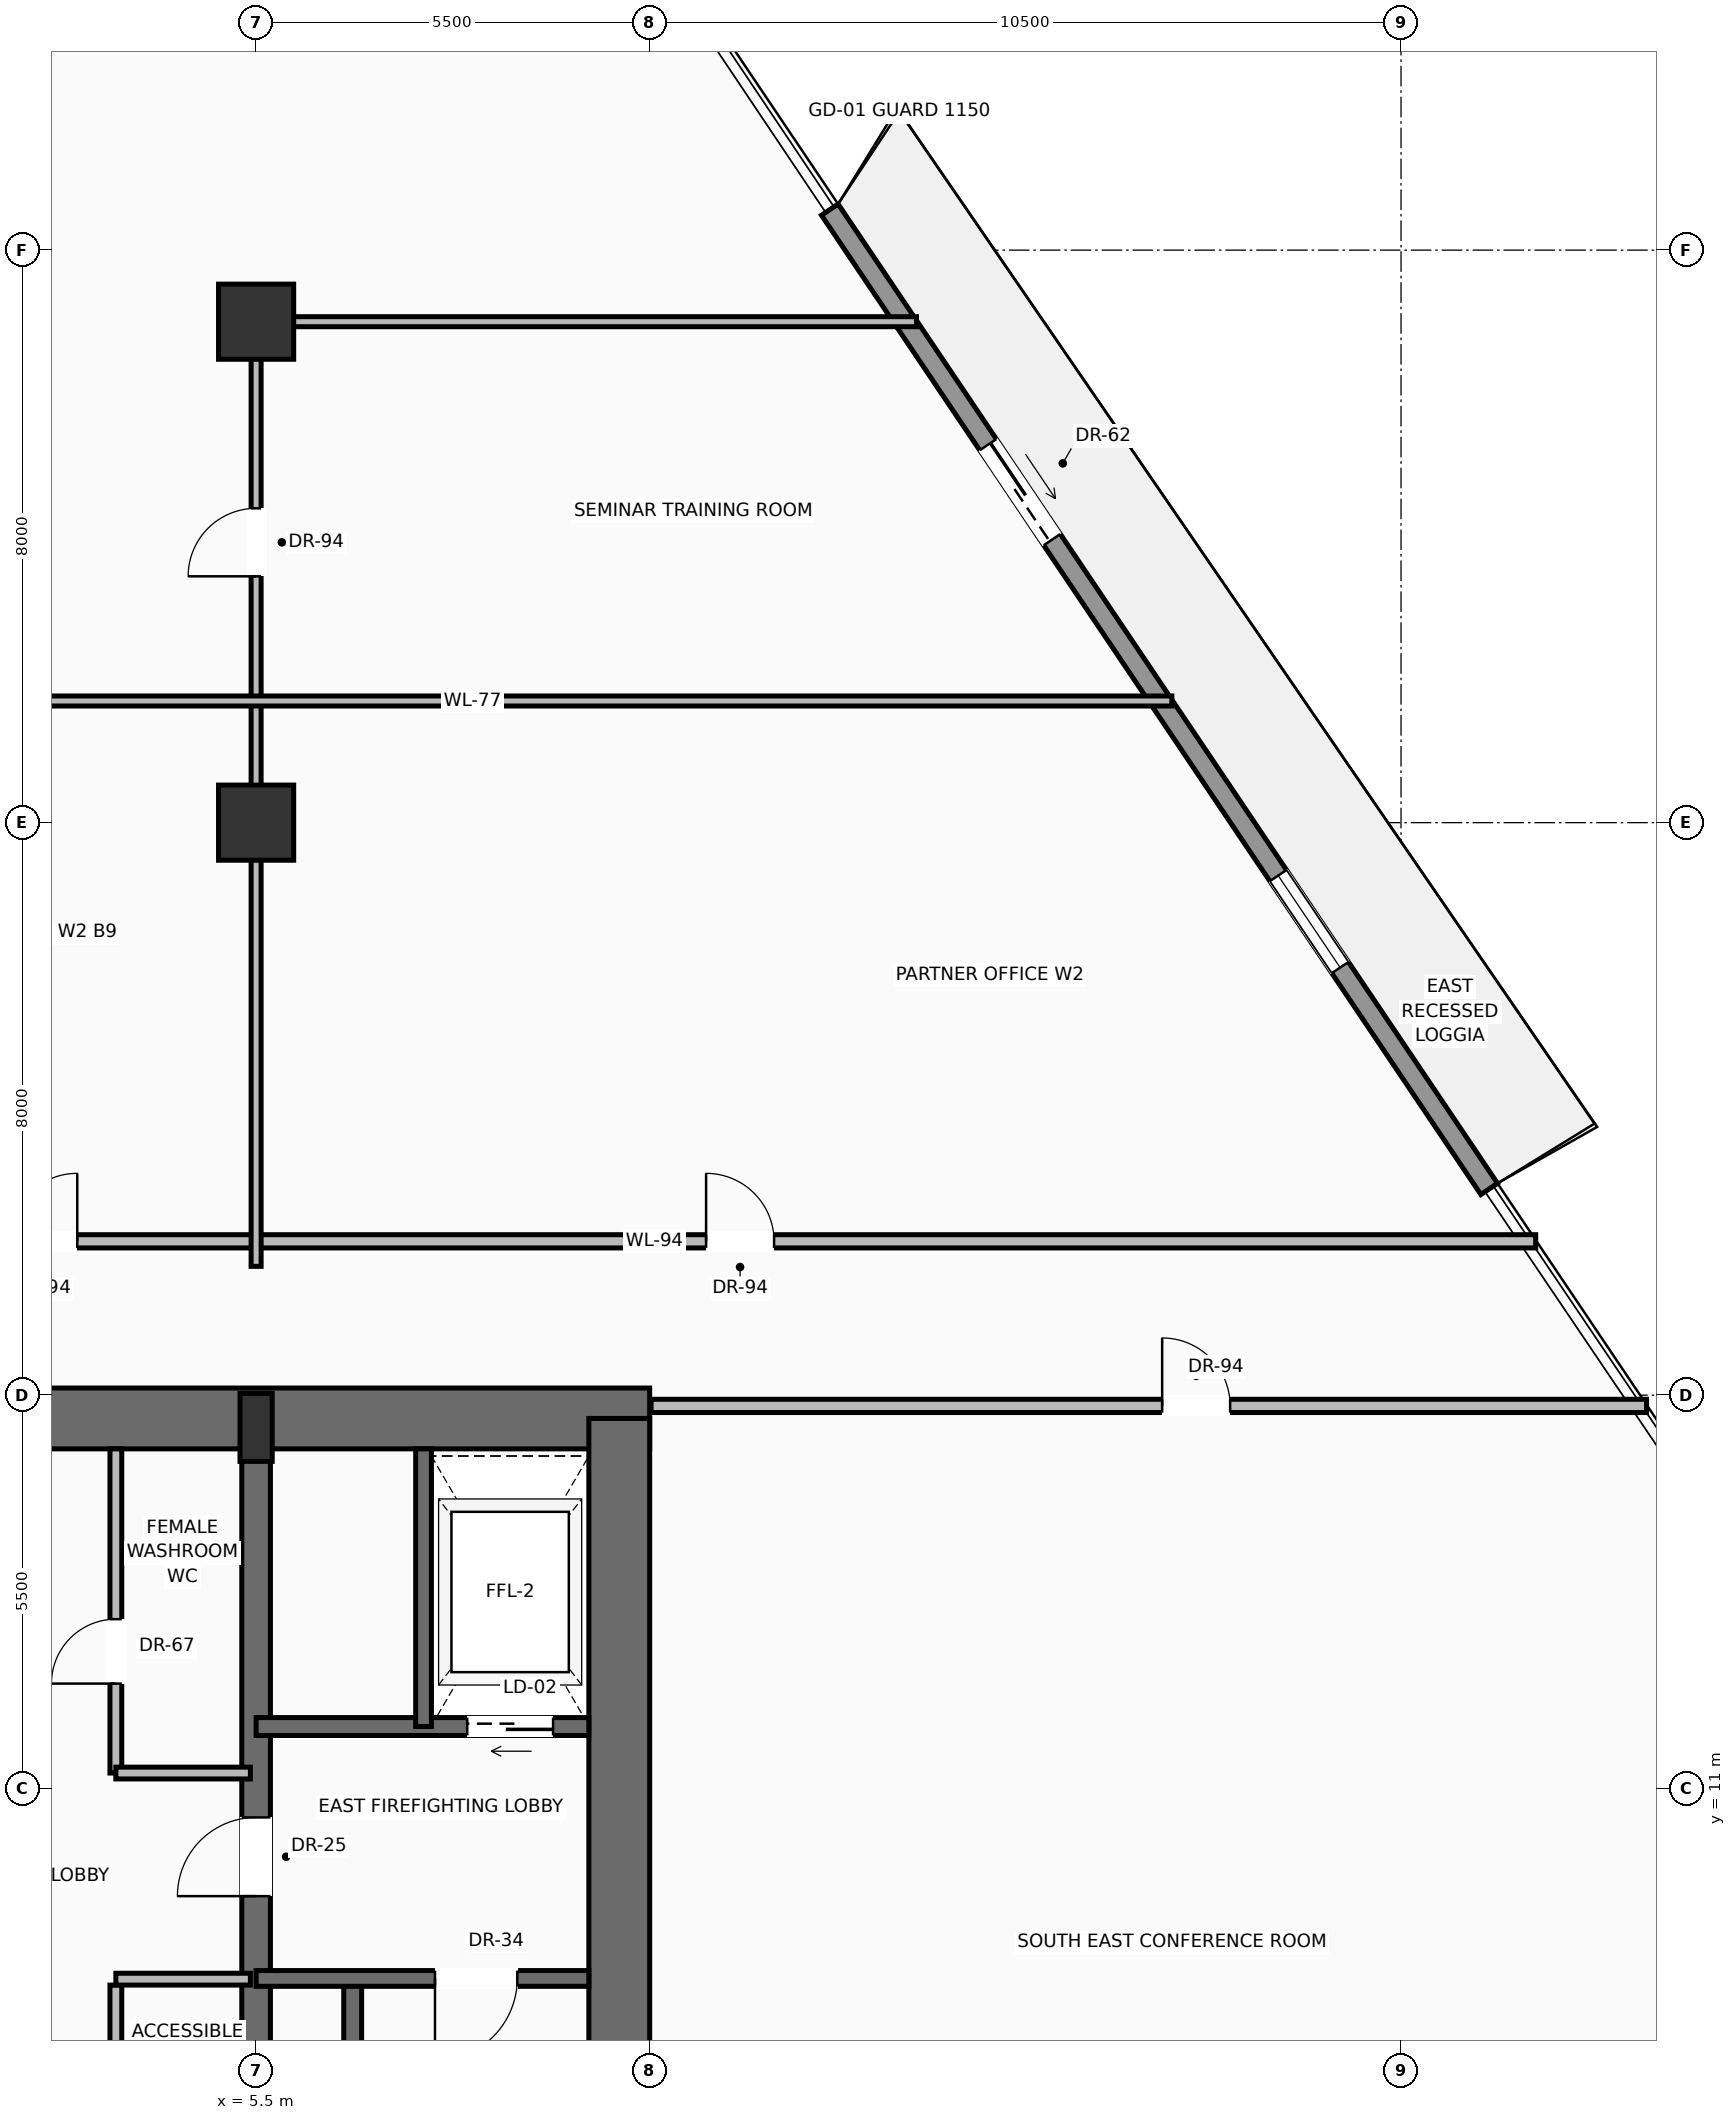
"""IFC4 building model, lengths in metres.
Left out: names, types, materials, properties, quantities, classifications, styles, units other than length and angle.
Written with IfcOpenShell. Run it as: python <this file> out.ifc"""

import sys

from ifc_helpers import new_model, si_unit, direction, frame, frame_2d, origin, origin_2d, place, context, subcontext, project, spatial, rectangle, extrude, source, transform, mapped, element, fill, save


model = new_model("IFC4")
c1 = context("Model", 3, precision=1e-05, world=origin(), true_north=direction((0.0, 1.0)))
c2 = subcontext(c1, "Body", "Model", "MODEL_VIEW")
j1 = project(units=[si_unit("LENGTHUNIT", "METRE"), si_unit("PLANEANGLEUNIT", "RADIAN")], contexts=[c1])
p1 = place(None, origin())
s1 = spatial("IfcSite", under=j1, at=p1, CompositionType="ELEMENT")
p2 = place(p1, origin())
s2 = spatial("IfcBuilding", under=s1, at=p2, CompositionType="ELEMENT")
p3 = place(p2, frame((0.0, 0.0, 42.3)))
s3 = spatial("IfcBuildingStorey", under=s2, at=p3, CompositionType="ELEMENT", Elevation=42.3)
p4 = place(p3, frame((-11.0, 16.175, 0.0), z_axis=(0.0, 0.0, 1.0), x_axis=(1.0, 0.0, 0.0)))
e1 = element("IfcWall", 1, at=p4, inside=s3, PredefinedType="SHEAR", context=c2, shape_type="SweptSolid", body=[
    extrude(rectangle(XDim=22.0, YDim=0.85, at=frame_2d((11.0, 0.0))), origin(), (0.0, 0.0, 1.0), 3.45),
])
p5 = place(p4, frame((3.57, 0.0, 0.0)))
e2 = element("IfcOpeningElement", 2, at=p5, cuts=e1, PredefinedType="OPENING", context=c2, shape_type="SweptSolid", body=[
    extrude(rectangle(XDim=1.3, YDim=2.3, at=frame_2d((0.65, 1.15))), frame((0.0, 0.435, 0.0), z_axis=(0.0, -1.0, 0.0), x_axis=(1.0, 0.0, 0.0)), (0.0, 0.0, 1.0), 0.87),
])
p6 = place(p4, frame((10.0, 0.0, 0.0)))
e3 = element("IfcOpeningElement", 3, at=p6, cuts=e1, PredefinedType="OPENING", context=c2, shape_type="SweptSolid", body=[
    extrude(rectangle(XDim=2.0, YDim=2.4, at=frame_2d((1.0, 1.2))), frame((0.0, 0.435, 0.0), z_axis=(0.0, -1.0, 0.0), x_axis=(1.0, 0.0, 0.0)), (0.0, 0.0, 1.0), 0.87),
])
p7 = place(p3, frame((10.575, 0.425, 0.0), z_axis=(0.0, 0.0, 1.0), x_axis=(0.0, 1.0, 0.0)))
e4 = element("IfcWall", 4, at=p7, inside=s3, PredefinedType="SHEAR", context=c2, shape_type="SweptSolid", body=[
    extrude(rectangle(XDim=15.75, YDim=0.85, at=frame_2d((7.875, 0.0))), origin(), (0.0, 0.0, 1.0), 3.45),
])
p8 = place(p3, frame((5.5, 0.425, 0.0), z_axis=(0.0, 0.0, 1.0), x_axis=(0.0, 1.0, 0.0)))
e5 = element("IfcWall", 5, at=p8, inside=s3, PredefinedType="SHEAR", context=c2, shape_type="SweptSolid", body=[
    extrude(rectangle(XDim=15.75, YDim=0.4, at=frame_2d((7.875, 0.0))), origin(), (0.0, 0.0, 1.0), 3.45),
])
p9 = place(p8, frame((9.075, 0.0, 0.0)))
e6 = element("IfcOpeningElement", 6, at=p9, cuts=e5, PredefinedType="OPENING", context=c2, shape_type="SweptSolid", body=[
    extrude(rectangle(XDim=1.1, YDim=2.2, at=frame_2d((0.55, 1.1))), frame((0.0, 0.21, 0.0), z_axis=(0.0, -1.0, 0.0), x_axis=(1.0, 0.0, 0.0)), (0.0, 0.0, 1.0), 0.42),
])
m1 = source(origin(), c2, "Body", "SweptSolid", [
    extrude(rectangle(XDim=0.45, YDim=0.95, at=origin_2d()), origin(), (0.0, 0.0, 1.0), 3.7),
])
p10 = place(p3, frame((5.5, 16.05, 0.0), z_axis=(0.0, 0.0, 1.0), x_axis=(1.0, 0.0, 0.0)))
e7 = element("IfcColumn", 7, at=p10, inside=s3, PredefinedType="PILASTER", context=c2, shape_type="MappedRepresentation", body=[
    mapped(m1, transform((0.0, 0.0, 0.0), scale=1.0)),
])
m2 = source(origin(), c2, "Body", "SweptSolid", [
    extrude(rectangle(XDim=1.05, YDim=1.05, at=origin_2d()), origin(), (0.0, 0.0, 1.0), 3.7),
])
for number, where, z_axis, x_axis in (
    (8, (5.5, 24.5, 0.0), (0.0, 0.0, 1.0), (1.0, 0.0, 0.0)),
    (9, (5.5, 31.5, 0.0), (0.0, 0.0, 1.0), (1.0, 0.0, 0.0)),
):
    element("IfcColumn", number, at=place(p3, frame(where, z_axis=z_axis, x_axis=x_axis)), inside=s3, PredefinedType="COLUMN", context=c2, shape_type="MappedRepresentation", body=[
        mapped(m2, transform((0.0, 0.0, 0.0), scale=1.0)),
    ])
p11 = place(p3, frame((13.517, 33.066, 0.0), z_axis=(0.0, 0.0, 1.0), x_axis=(0.558563601605, -0.829461694692, 0.0)))
e10 = element("IfcWall", 10, at=p11, inside=s3, PredefinedType="SOLIDWALL", context=c2, shape_type="SweptSolid", body=[
    extrude(rectangle(XDim=16.497, YDim=0.28, at=frame_2d((8.249, 0.0))), origin(), (0.0, 0.0, 1.0), 3.03),
])
p12 = place(p11, frame((3.959, 0.0, 0.0)))
e11 = element("IfcOpeningElement", 11, at=p12, cuts=e10, PredefinedType="OPENING", context=c2, shape_type="SweptSolid", body=[
    extrude(rectangle(XDim=1.6, YDim=2.35, at=frame_2d((0.8, 1.175))), frame((0.0, 0.15, 0.0), z_axis=(0.0, -1.0, 0.0), x_axis=(1.0, 0.0, 0.0)), (0.0, 0.0, 1.0), 0.3),
])
p13 = place(p11, frame((11.218, 0.0, 0.9)))
e12 = element("IfcOpeningElement", 12, at=p13, cuts=e10, PredefinedType="OPENING", context=c2, shape_type="SweptSolid", body=[
    extrude(rectangle(XDim=1.55, YDim=1.85, at=frame_2d((0.775, 0.925))), frame((0.0, 0.15, 0.0), z_axis=(0.0, -1.0, 0.0), x_axis=(1.0, 0.0, 0.0)), (0.0, 0.0, 1.0), 0.3),
])
p14 = place(p3, frame((6.85, 0.85, 0.0), z_axis=(0.0, 0.0, 1.0), x_axis=(0.0, 1.0, 0.0)))
e13 = element("IfcWall", 13, at=p14, inside=s3, PredefinedType="SOLIDWALL", context=c2, shape_type="SweptSolid", body=[
    extrude(rectangle(XDim=7.5, YDim=0.25, at=frame_2d((3.75, 0.0))), origin(), (0.0, 0.0, 1.0), 3.45),
])
p15 = place(p3, frame((10.15, 8.35, 0.0), z_axis=(0.0, 0.0, 1.0), x_axis=(-1.0, 0.0, 0.0)))
e14 = element("IfcWall", 14, at=p15, inside=s3, PredefinedType="SOLIDWALL", context=c2, shape_type="SweptSolid", body=[
    extrude(rectangle(XDim=4.65, YDim=0.22, at=frame_2d((2.325, 0.0))), origin(), (0.0, 0.0, 1.0), 3.45),
])
p16 = place(p15, frame((1.0, 0.0, 0.0)))
e15 = element("IfcOpeningElement", 15, at=p16, cuts=e14, PredefinedType="OPENING", context=c2, shape_type="SweptSolid", body=[
    extrude(rectangle(XDim=1.15, YDim=2.2, at=frame_2d((0.575, 1.1))), frame((0.0, 0.12, 0.0), z_axis=(0.0, -1.0, 0.0), x_axis=(1.0, 0.0, 0.0)), (0.0, 0.0, 1.0), 0.24),
])
p17 = place(p3, frame((10.15, 11.87, 0.0), z_axis=(0.0, 0.0, 1.0), x_axis=(-1.0, 0.0, 0.0)))
e16 = element("IfcWall", 16, at=p17, inside=s3, PredefinedType="SOLIDWALL", context=c2, shape_type="SweptSolid", body=[
    extrude(rectangle(XDim=4.65, YDim=0.25, at=frame_2d((2.325, 0.0))), origin(), (0.0, 0.0, 1.0), 3.45),
])
p18 = place(p17, frame((0.5, 0.0, 0.0)))
e17 = element("IfcOpeningElement", 17, at=p18, cuts=e16, PredefinedType="OPENING", context=c2, shape_type="SweptSolid", body=[
    extrude(rectangle(XDim=1.2, YDim=2.25, at=frame_2d((0.6, 1.125))), frame((0.0, 0.135, 0.0), z_axis=(0.0, -1.0, 0.0), x_axis=(1.0, 0.0, 0.0)), (0.0, 0.0, 1.0), 0.27),
])
p19 = place(p3, frame((7.84, 11.87, 0.0), z_axis=(0.0, 0.0, 1.0), x_axis=(0.0, 1.0, 0.0)))
e18 = element("IfcWall", 18, at=p19, inside=s3, PredefinedType="SOLIDWALL", context=c2, shape_type="SweptSolid", body=[
    extrude(rectangle(XDim=3.88, YDim=0.22, at=frame_2d((1.94, 0.0))), origin(), (0.0, 0.0, 1.0), 3.45),
])
p20 = place(p3, frame((3.54, 3.933, 0.0), z_axis=(0.0, 0.0, 1.0), x_axis=(0.0, 1.0, 0.0)))
e19 = element("IfcWall", 19, at=p20, inside=s3, PredefinedType="PARTITIONING", context=c2, shape_type="SweptSolid", body=[
    extrude(rectangle(XDim=4.325, YDim=0.165, at=frame_2d((2.163, 0.0))), origin(), (0.0, 0.0, 1.0), 3.442),
])
p21 = place(p20, frame((1.946, 0.0, 0.0)))
e20 = element("IfcOpeningElement", 20, at=p21, cuts=e19, PredefinedType="OPENING", context=c2, shape_type="SweptSolid", body=[
    extrude(rectangle(XDim=0.9, YDim=2.1, at=frame_2d((0.45, 1.05))), frame((0.0, 0.093, 0.0), z_axis=(0.0, -1.0, 0.0), x_axis=(1.0, 0.0, 0.0)), (0.0, 0.0, 1.0), 0.185),
])
p22 = place(p3, frame((3.54, 8.34, 0.0), z_axis=(0.0, 0.0, 1.0), x_axis=(1.0, 0.0, 0.0)))
e21 = element("IfcWall", 21, at=p22, inside=s3, PredefinedType="PARTITIONING", context=c2, shape_type="SweptSolid", body=[
    extrude(rectangle(XDim=1.88, YDim=0.165, at=frame_2d((0.94, 0.0))), origin(), (0.0, 0.0, 1.0), 3.442),
])
p23 = place(p3, frame((3.54, 11.22, 0.0), z_axis=(0.0, 0.0, 1.0), x_axis=(0.0, 1.0, 0.0)))
e22 = element("IfcWall", 22, at=p23, inside=s3, PredefinedType="PARTITIONING", context=c2, shape_type="SweptSolid", body=[
    extrude(rectangle(XDim=4.53, YDim=0.165, at=frame_2d((2.265, 0.0))), origin(), (0.0, 0.0, 1.0), 3.442),
])
p24 = place(p23, frame((1.25, 0.0, 0.0)))
e23 = element("IfcOpeningElement", 23, at=p24, cuts=e22, PredefinedType="OPENING", context=c2, shape_type="SweptSolid", body=[
    extrude(rectangle(XDim=0.9, YDim=2.1, at=frame_2d((0.45, 1.05))), frame((0.0, 0.093, 0.0), z_axis=(0.0, -1.0, 0.0), x_axis=(1.0, 0.0, 0.0)), (0.0, 0.0, 1.0), 0.185),
])
p25 = place(p3, frame((3.54, 11.22, 0.0), z_axis=(0.0, 0.0, 1.0), x_axis=(1.0, 0.0, 0.0)))
e24 = element("IfcWall", 24, at=p25, inside=s3, PredefinedType="PARTITIONING", context=c2, shape_type="SweptSolid", body=[
    extrude(rectangle(XDim=1.88, YDim=0.165, at=frame_2d((0.94, 0.0))), origin(), (0.0, 0.0, 1.0), 3.442),
])
p26 = place(p3, frame((11.02, 16.35, 0.0), z_axis=(0.0, 0.0, 1.0), x_axis=(1.0, 0.0, 0.0)))
e25 = element("IfcWall", 25, at=p26, inside=s3, PredefinedType="PARTITIONING", context=c2, shape_type="SweptSolid", body=[
    extrude(rectangle(XDim=13.91, YDim=0.185, at=frame_2d((6.955, 0.0))), origin(), (0.0, 0.0, 1.0), 2.747),
])
p27 = place(p26, frame((7.142, 0.0, 0.0)))
e26 = element("IfcOpeningElement", 26, at=p27, cuts=e25, PredefinedType="OPENING", context=c2, shape_type="SweptSolid", body=[
    extrude(rectangle(XDim=0.95, YDim=2.2, at=frame_2d((0.475, 1.1))), frame((0.0, 0.103, 0.0), z_axis=(0.0, -1.0, 0.0), x_axis=(1.0, 0.0, 0.0)), (0.0, 0.0, 1.0), 0.205),
])
p28 = place(p3, frame((-1.25, 18.65, 0.0), z_axis=(0.0, 0.0, 1.0), x_axis=(1.0, 0.0, 0.0)))
e27 = element("IfcWall", 27, at=p28, inside=s3, PredefinedType="PARTITIONING", context=c2, shape_type="SweptSolid", body=[
    extrude(rectangle(XDim=24.632, YDim=0.185, at=frame_2d((12.316, 0.0))), origin(), (0.0, 0.0, 1.0), 2.747),
])
p29 = place(p28, frame((13.038, 0.0, 0.0)))
e28 = element("IfcOpeningElement", 28, at=p29, cuts=e27, PredefinedType="OPENING", context=c2, shape_type="SweptSolid", body=[
    extrude(rectangle(XDim=0.95, YDim=2.2, at=frame_2d((0.475, 1.1))), frame((0.0, 0.103, 0.0), z_axis=(0.0, -1.0, 0.0), x_axis=(1.0, 0.0, 0.0)), (0.0, 0.0, 1.0), 0.205),
])
p30 = place(p28, frame((3.301, 0.0, 0.0)))
e29 = element("IfcOpeningElement", 29, at=p30, cuts=e27, PredefinedType="OPENING", context=c2, shape_type="SweptSolid", body=[
    extrude(rectangle(XDim=0.95, YDim=2.2, at=frame_2d((0.475, 1.1))), frame((0.0, 0.103, 0.0), z_axis=(0.0, -1.0, 0.0), x_axis=(1.0, 0.0, 0.0)), (0.0, 0.0, 1.0), 0.205),
])
p31 = place(p3, frame((5.5, 18.3, 0.0), z_axis=(0.0, 0.0, 1.0), x_axis=(0.0, 1.0, 0.0)))
e30 = element("IfcWall", 30, at=p31, inside=s3, PredefinedType="PARTITIONING", context=c2, shape_type="SweptSolid", body=[
    extrude(rectangle(XDim=13.2, YDim=0.14, at=frame_2d((6.6, 0.0))), origin(), (0.0, 0.0, 1.0), 2.747),
])
p32 = place(p31, frame((9.642, 0.0, 0.0)))
e31 = element("IfcOpeningElement", 31, at=p32, cuts=e30, PredefinedType="OPENING", context=c2, shape_type="SweptSolid", body=[
    extrude(rectangle(XDim=0.95, YDim=2.2, at=frame_2d((0.475, 1.1))), frame((0.0, 0.08, 0.0), z_axis=(0.0, -1.0, 0.0), x_axis=(1.0, 0.0, 0.0)), (0.0, 0.0, 1.0), 0.16),
])
p33 = place(p3, frame((5.5, 31.5, 0.0), z_axis=(0.0, 0.0, 1.0), x_axis=(1.0, 0.0, 0.0)))
e32 = element("IfcWall", 32, at=p33, inside=s3, PredefinedType="PARTITIONING", context=c2, shape_type="SweptSolid", body=[
    extrude(rectangle(XDim=9.229, YDim=0.14, at=frame_2d((4.614, 0.0))), origin(), (0.0, 0.0, 1.0), 2.747),
])
p34 = place(p3, frame((-1.25, 26.2, 0.0), z_axis=(0.0, 0.0, 1.0), x_axis=(1.0, 0.0, 0.0)))
e33 = element("IfcWall", 33, at=p34, inside=s3, PredefinedType="PARTITIONING", context=c2, shape_type="SweptSolid", body=[
    extrude(rectangle(XDim=19.548, YDim=0.14, at=frame_2d((9.774, 0.0))), origin(), (0.0, 0.0, 1.0), 2.747),
])
m3 = source(origin(), c2, "Body", "SweptSolid", [
    extrude(rectangle(XDim=1.6, YDim=2.35, at=frame_2d((0.8, 1.175))), frame((0.0, 0.025, 0.0), z_axis=(0.0, -1.0, 0.0), x_axis=(1.0, 0.0, 0.0)), (0.0, 0.0, 1.0), 0.05),
])
p35 = place(p12, origin())
e34 = element("IfcDoor", 34, at=p35, inside=s3, OperationType="SLIDING_TO_RIGHT", PredefinedType="DOOR", context=c2, shape_type="MappedRepresentation", body=[
    mapped(m3, transform((0.0, 0.0, 0.0), scale=1.0)),
])
fill(e11, e34)
m4 = source(origin(), c2, "Body", "SweptSolid", [
    extrude(rectangle(XDim=1.55, YDim=1.85, at=frame_2d((0.775, 0.925))), frame((0.0, 0.03, 0.0), z_axis=(0.0, -1.0, 0.0), x_axis=(1.0, 0.0, 0.0)), (0.0, 0.0, 1.0), 0.06),
])
p36 = place(p13, origin())
e35 = element("IfcWindow", 35, at=p36, inside=s3, PartitioningType="SINGLE_PANEL", PredefinedType="WINDOW", context=c2, shape_type="MappedRepresentation", body=[
    mapped(m4, transform((0.0, 0.0, 0.0), scale=1.0)),
])
fill(e12, e35)
m5 = source(origin(), c2, "Body", "SweptSolid", [
    extrude(rectangle(XDim=1.15, YDim=2.2, at=frame_2d((0.575, 1.1))), frame((0.0, 0.025, 0.0), z_axis=(0.0, -1.0, 0.0), x_axis=(1.0, 0.0, 0.0)), (0.0, 0.0, 1.0), 0.05),
])
p37 = place(p16, origin())
e36 = element("IfcDoor", 36, at=p37, inside=s3, OperationType="SINGLE_SWING_RIGHT", PredefinedType="DOOR", context=c2, shape_type="MappedRepresentation", body=[
    mapped(m5, transform((0.0, 0.0, 0.0), scale=1.0)),
])
fill(e15, e36)
m6 = source(origin(), c2, "Body", "SweptSolid", [
    extrude(rectangle(XDim=1.1, YDim=2.2, at=frame_2d((0.55, 1.1))), frame((0.0, 0.025, 0.0), z_axis=(0.0, -1.0, 0.0), x_axis=(1.0, 0.0, 0.0)), (0.0, 0.0, 1.0), 0.05),
])
p38 = place(p9, origin())
e37 = element("IfcDoor", 37, at=p38, inside=s3, OperationType="SINGLE_SWING_LEFT", PredefinedType="DOOR", context=c2, shape_type="MappedRepresentation", body=[
    mapped(m6, transform((0.0, 0.0, 0.0), scale=1.0)),
])
fill(e6, e37)
m7 = source(origin(), c2, "Body", "SweptSolid", [
    extrude(rectangle(XDim=1.2, YDim=2.25, at=frame_2d((0.6, 1.125))), frame((0.0, 0.025, 0.0), z_axis=(0.0, -1.0, 0.0), x_axis=(1.0, 0.0, 0.0)), (0.0, 0.0, 1.0), 0.05),
])
p39 = place(p18, origin())
e38 = element("IfcDoor", 38, at=p39, inside=s3, OperationType="SLIDING_TO_RIGHT", PredefinedType="DOOR", context=c2, shape_type="MappedRepresentation", body=[
    mapped(m7, transform((0.0, 0.0, 0.0), scale=1.0)),
])
fill(e17, e38)
m8 = source(origin(), c2, "Body", "SweptSolid", [
    extrude(rectangle(XDim=0.9, YDim=2.1, at=frame_2d((0.45, 1.05))), frame((0.0, 0.025, 0.0), z_axis=(0.0, -1.0, 0.0), x_axis=(1.0, 0.0, 0.0)), (0.0, 0.0, 1.0), 0.05),
])
p40 = place(p24, origin())
e39 = element("IfcDoor", 39, at=p40, inside=s3, OperationType="SINGLE_SWING_LEFT", PredefinedType="DOOR", context=c2, shape_type="MappedRepresentation", body=[
    mapped(m8, transform((0.0, 0.0, 0.0), scale=1.0)),
])
fill(e23, e39)
m9 = source(origin(), c2, "Body", "SweptSolid", [
    extrude(rectangle(XDim=0.95, YDim=2.2, at=frame_2d((0.475, 1.1))), frame((0.0, 0.025, 0.0), z_axis=(0.0, -1.0, 0.0), x_axis=(1.0, 0.0, 0.0)), (0.0, 0.0, 1.0), 0.05),
])
p41 = place(p27, origin())
e40 = element("IfcDoor", 40, at=p41, inside=s3, OperationType="SINGLE_SWING_LEFT", PredefinedType="DOOR", context=c2, shape_type="MappedRepresentation", body=[
    mapped(m9, transform((0.0, 0.0, 0.0), scale=1.0)),
])
fill(e26, e40)
p42 = place(p29, origin())
e41 = element("IfcDoor", 41, at=p42, inside=s3, OperationType="SINGLE_SWING_LEFT", PredefinedType="DOOR", context=c2, shape_type="MappedRepresentation", body=[
    mapped(m9, transform((0.0, 0.0, 0.0), scale=1.0)),
])
fill(e28, e41)
p43 = place(p30, origin())
e42 = element("IfcDoor", 42, at=p43, inside=s3, OperationType="SINGLE_SWING_RIGHT", PredefinedType="DOOR", context=c2, shape_type="MappedRepresentation", body=[
    mapped(m9, transform((0.0, 0.0, 0.0), scale=1.0)),
])
fill(e29, e42)
p44 = place(p32, origin())
e43 = element("IfcDoor", 43, at=p44, inside=s3, OperationType="SINGLE_SWING_LEFT", PredefinedType="DOOR", context=c2, shape_type="MappedRepresentation", body=[
    mapped(m9, transform((0.0, 0.0, 0.0), scale=1.0)),
])
fill(e31, e43)
save(model, sys.argv[1])
